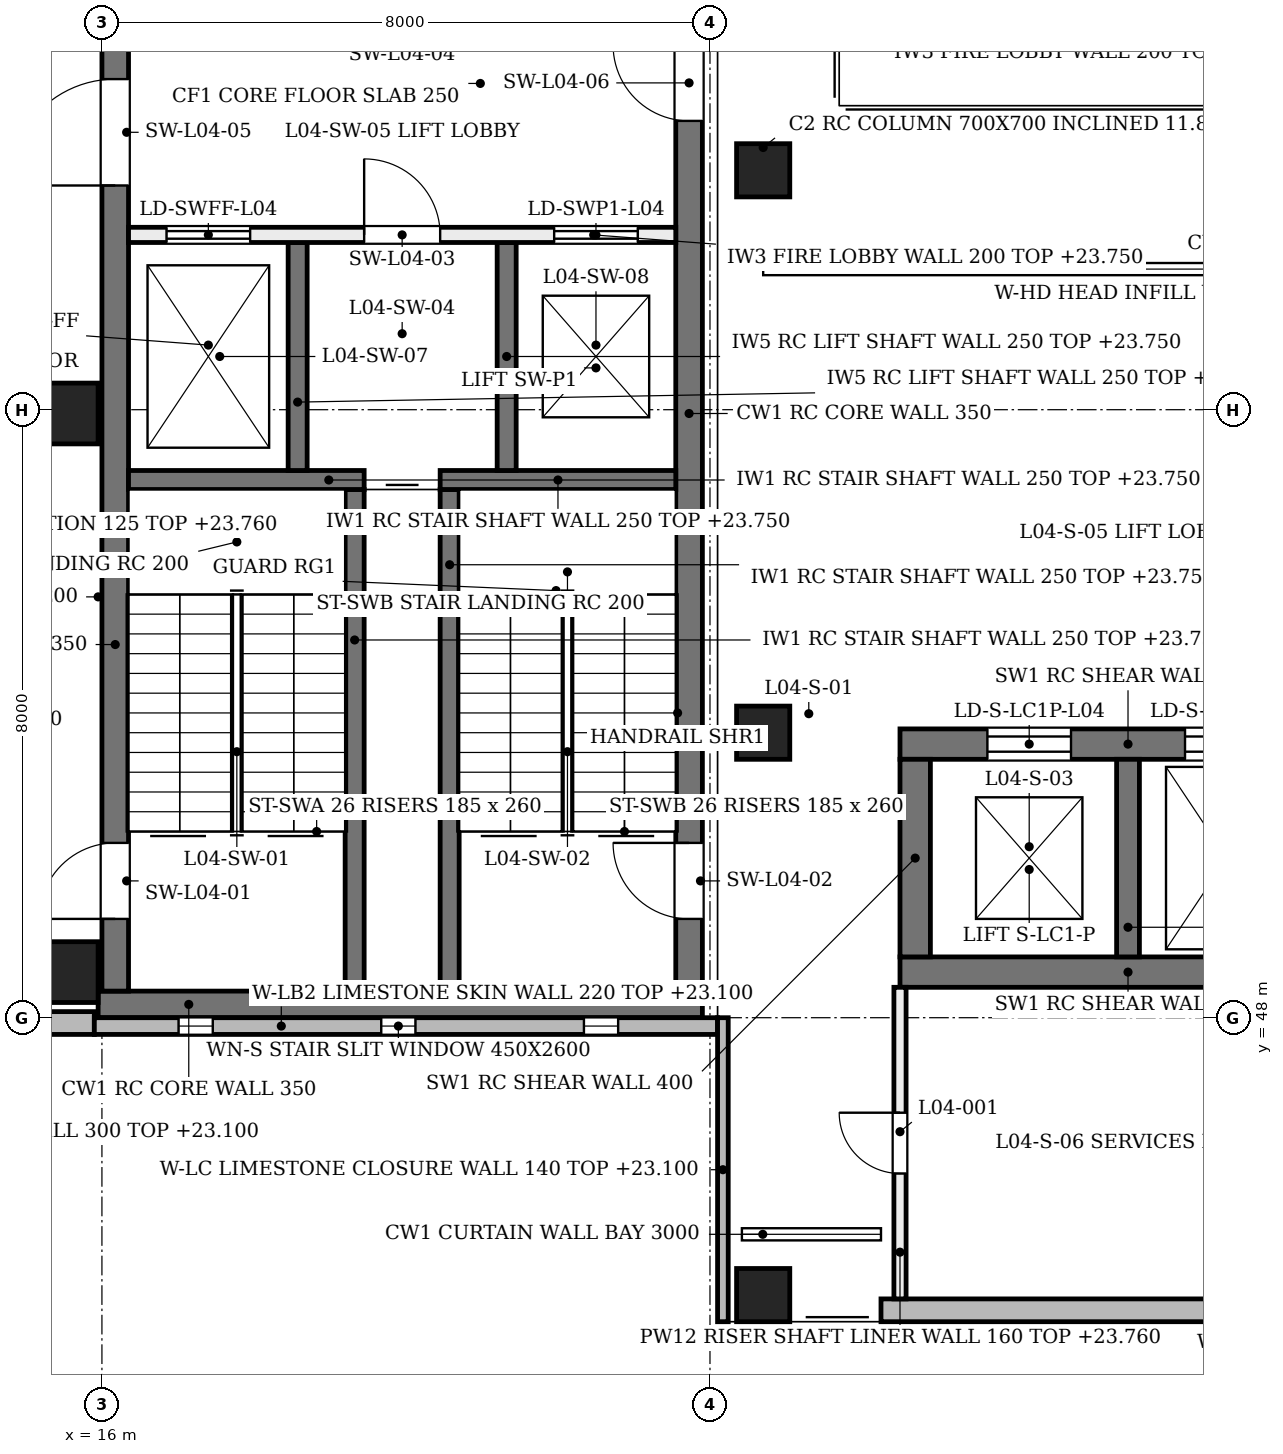
"""IFC4 building model, lengths in metres.
Left out: names, types, materials, properties, quantities, classifications, styles, units other than length and angle.
Written with IfcOpenShell. Run it as: python <this file> out.ifc"""

import sys

from ifc_helpers import new_model, si_unit, direction, frame, frame_2d, origin, origin_2d, place, context, subcontext, project, spatial, rectangle, extrude, element, fill, save


model = new_model("IFC4")
c1 = context("Model", 3, precision=1e-05, world=origin(), true_north=direction((0.0, 1.0)))
c2 = subcontext(c1, "Body", "Model", "MODEL_VIEW")
j1 = project(units=[si_unit("LENGTHUNIT", "METRE"), si_unit("PLANEANGLEUNIT", "RADIAN")], contexts=[c1])
p1 = place(None, origin())
s1 = spatial("IfcSite", under=j1, at=p1, CompositionType="ELEMENT")
p2 = place(p1, origin())
s2 = spatial("IfcBuilding", under=s1, at=p2, CompositionType="ELEMENT")
p3 = place(p2, frame((0.0, 0.0, 19.2)))
s3 = spatial("IfcBuildingStorey", under=s2, at=p3, CompositionType="ELEMENT", Elevation=19.2)
p4 = place(p3, frame((26.5, 48.6, 0.0), z_axis=(0.0, 0.0, 1.0), x_axis=(1.0, 0.0, 0.0)))
e1 = element("IfcWall", 1, at=p4, inside=s3, PredefinedType="SHEAR", context=c2, shape_type="SweptSolid", body=[
    extrude(rectangle(XDim=6.0, YDim=0.4, at=frame_2d((3.0, 0.0))), origin(), (0.0, 0.0, 1.0), 4.58),
])
p5 = place(p3, frame((26.5, 51.6, 0.0), z_axis=(0.0, 0.0, 1.0), x_axis=(1.0, 0.0, 0.0)))
e2 = element("IfcWall", 2, at=p5, inside=s3, PredefinedType="SHEAR", context=c2, shape_type="SweptSolid", body=[
    extrude(rectangle(XDim=6.0, YDim=0.4, at=frame_2d((3.0, 0.0))), origin(), (0.0, 0.0, 1.0), 4.58),
])
p6 = place(p5, frame((1.15, 0.0, 0.0)))
e3 = element("IfcOpeningElement", 3, at=p6, cuts=e2, PredefinedType="OPENING", context=c2, shape_type="SweptSolid", body=[
    extrude(rectangle(XDim=1.1, YDim=2.1, at=frame_2d((0.55, 1.05))), frame((0.0, 0.21, 0.0), z_axis=(0.0, -1.0, 0.0), x_axis=(1.0, 0.0, 0.0)), (0.0, 0.0, 1.0), 0.42),
])
p7 = place(p5, frame((3.75, 0.0, 0.0)))
e4 = element("IfcOpeningElement", 4, at=p7, cuts=e2, PredefinedType="OPENING", context=c2, shape_type="SweptSolid", body=[
    extrude(rectangle(XDim=1.1, YDim=2.1, at=frame_2d((0.55, 1.05))), frame((0.0, 0.21, 0.0), z_axis=(0.0, -1.0, 0.0), x_axis=(1.0, 0.0, 0.0)), (0.0, 0.0, 1.0), 0.42),
])
p8 = place(p3, frame((26.7, 48.8, 0.0), z_axis=(0.0, 0.0, 1.0), x_axis=(0.0, 1.0, 0.0)))
e5 = element("IfcWall", 5, at=p8, inside=s3, PredefinedType="SHEAR", context=c2, shape_type="SweptSolid", body=[
    extrude(rectangle(XDim=2.6, YDim=0.4, at=frame_2d((1.3, 0.0))), origin(), (0.0, 0.0, 1.0), 4.58),
])
p9 = place(p3, frame((29.5, 48.8, 0.0), z_axis=(0.0, 0.0, 1.0), x_axis=(0.0, 1.0, 0.0)))
e6 = element("IfcWall", 6, at=p9, inside=s3, PredefinedType="SHEAR", context=c2, shape_type="SweptSolid", body=[
    extrude(rectangle(XDim=2.6, YDim=0.3, at=frame_2d((1.3, 0.0))), origin(), (0.0, 0.0, 1.0), 4.58),
])
p10 = place(p3, frame((15.95, 48.175, 0.0), z_axis=(0.0, 0.0, 1.0), x_axis=(1.0, 0.0, 0.0)))
e7 = element("IfcWall", 7, at=p10, inside=s3, PredefinedType="SHEAR", context=c2, shape_type="SweptSolid", body=[
    extrude(rectangle(XDim=7.95, YDim=0.35, at=frame_2d((3.975, 0.0))), origin(), (0.0, 0.0, 1.0), 4.58),
])
p11 = place(p3, frame((16.175, 48.35, 0.0), z_axis=(0.0, 0.0, 1.0), x_axis=(0.0, 1.0, 0.0)))
e8 = element("IfcWall", 8, at=p11, inside=s3, PredefinedType="SHEAR", context=c2, shape_type="SweptSolid", body=[
    extrude(rectangle(XDim=15.2, YDim=0.35, at=frame_2d((7.6, 0.0))), origin(), (0.0, 0.0, 1.0), 4.58),
])
p12 = place(p11, frame((0.95, 0.0, 0.0)))
e9 = element("IfcOpeningElement", 9, at=p12, cuts=e8, PredefinedType="OPENING", context=c2, shape_type="SweptSolid", body=[
    extrude(rectangle(XDim=1.0, YDim=2.1, at=frame_2d((0.5, 1.05))), frame((0.0, 0.185, 0.0), z_axis=(0.0, -1.0, 0.0), x_axis=(1.0, 0.0, 0.0)), (0.0, 0.0, 1.0), 0.37),
])
p13 = place(p11, frame((10.6, 0.0, 0.0)))
e10 = element("IfcOpeningElement", 10, at=p13, cuts=e8, PredefinedType="OPENING", context=c2, shape_type="SweptSolid", body=[
    extrude(rectangle(XDim=1.4, YDim=2.1, at=frame_2d((0.7, 1.05))), frame((0.0, 0.185, 0.0), z_axis=(0.0, -1.0, 0.0), x_axis=(1.0, 0.0, 0.0)), (0.0, 0.0, 1.0), 0.37),
])
p14 = place(p3, frame((23.725, 48.35, 0.0), z_axis=(0.0, 0.0, 1.0), x_axis=(0.0, 1.0, 0.0)))
e11 = element("IfcWall", 11, at=p14, inside=s3, PredefinedType="SHEAR", context=c2, shape_type="SweptSolid", body=[
    extrude(rectangle(XDim=15.2, YDim=0.35, at=frame_2d((7.6, 0.0))), origin(), (0.0, 0.0, 1.0), 4.58),
])
p15 = place(p14, frame((0.95, 0.0, 0.0)))
e12 = element("IfcOpeningElement", 12, at=p15, cuts=e11, PredefinedType="OPENING", context=c2, shape_type="SweptSolid", body=[
    extrude(rectangle(XDim=1.0, YDim=2.1, at=frame_2d((0.5, 1.05))), frame((0.0, 0.185, 0.0), z_axis=(0.0, -1.0, 0.0), x_axis=(1.0, 0.0, 0.0)), (0.0, 0.0, 1.0), 0.37),
])
p16 = place(p14, frame((11.45, 0.0, 0.0)))
e13 = element("IfcOpeningElement", 13, at=p16, cuts=e11, PredefinedType="OPENING", context=c2, shape_type="SweptSolid", body=[
    extrude(rectangle(XDim=1.0, YDim=2.1, at=frame_2d((0.5, 1.05))), frame((0.0, 0.185, 0.0), z_axis=(0.0, -1.0, 0.0), x_axis=(1.0, 0.0, 0.0)), (0.0, 0.0, 1.0), 0.37),
])
for number, where, z_axis, x_axis in (
    (14, (15.55, 48.6, 0.0), (0.0, 0.0, 1.0), (1.0, 0.0, 0.0)),
    (15, (15.55, 55.95, 0.0), (0.0, 0.0, 1.0), (1.0, 0.0, 0.0)),
):
    element("IfcColumn", number, at=place(p3, frame(where, z_axis=z_axis, x_axis=x_axis)), inside=s3, PredefinedType="COLUMN", context=c2, shape_type="SweptSolid", body=[
        extrude(rectangle(XDim=0.8, YDim=0.8, at=origin_2d()), origin(), (0.0, 0.0, 1.0), 4.8),
    ])
for number, where, z_axis, x_axis in (
    (16, (24.7, 44.6, 0.0), (0.0, -0.204, 0.979), (1.0, 0.0, 0.0)),
    (17, (24.7, 52.0, 0.0), (0.0, -0.204, 0.979), (1.0, 0.0, 0.0)),
    (18, (24.7, 59.4, 0.0), (0.0, -0.204, 0.979), (1.0, 0.0, 0.0)),
):
    element("IfcColumn", number, at=place(p3, frame(where, z_axis=z_axis, x_axis=x_axis)), inside=s3, PredefinedType="COLUMN", context=c2, shape_type="SweptSolid", body=[
        extrude(rectangle(XDim=0.7, YDim=0.7, at=origin_2d()), origin(), (0.0, 0.0, 1.0), 4.903),
    ])
p17 = place(p3, frame((26.25, 44.15, 0.0), z_axis=(0.0, 0.0, 1.0), x_axis=(1.0, 0.0, 0.0)))
e19 = element("IfcWall", 19, at=p17, inside=s3, PredefinedType="SOLIDWALL", context=c2, shape_type="SweptSolid", body=[
    extrude(rectangle(XDim=6.5, YDim=0.3, at=frame_2d((3.25, 0.0))), origin(), (0.0, 0.0, 1.0), 3.9),
])
p18 = place(p3, frame((24.9, 57.85, 4.1), z_axis=(0.0, 0.0, 1.0), x_axis=(1.0, 0.0, 0.0)))
e20 = element("IfcWall", 20, at=p18, inside=s3, PredefinedType="SOLIDWALL", context=c2, shape_type="SweptSolid", body=[
    extrude(rectangle(XDim=6.9, YDim=0.15, at=frame_2d((3.45, 0.0))), origin(), (0.0, 0.0, 1.0), 0.48),
])
p19 = place(p3, frame((8.0, 47.93, 0.0), z_axis=(0.0, 0.0, 1.0), x_axis=(1.0, 0.0, 0.0)))
e21 = element("IfcWall", 21, at=p19, inside=s3, PredefinedType="SOLIDWALL", context=c2, shape_type="SweptSolid", body=[
    extrude(rectangle(XDim=7.9, YDim=0.3, at=frame_2d((3.95, 0.0))), origin(), (0.0, 0.0, 1.0), 3.9),
])
p20 = place(p19, frame((0.717, 0.0, 0.75)))
e22 = element("IfcOpeningElement", 22, at=p20, cuts=e21, PredefinedType="OPENING", context=c2, shape_type="SweptSolid", body=[
    extrude(rectangle(XDim=1.2, YDim=3.1, at=frame_2d((0.6, 1.55))), frame((0.0, 0.16, 0.0), z_axis=(0.0, -1.0, 0.0), x_axis=(1.0, 0.0, 0.0)), (0.0, 0.0, 1.0), 0.32),
])
p21 = place(p19, frame((3.35, 0.0, 0.75)))
e23 = element("IfcOpeningElement", 23, at=p21, cuts=e21, PredefinedType="OPENING", context=c2, shape_type="SweptSolid", body=[
    extrude(rectangle(XDim=1.2, YDim=3.1, at=frame_2d((0.6, 1.55))), frame((0.0, 0.16, 0.0), z_axis=(0.0, -1.0, 0.0), x_axis=(1.0, 0.0, 0.0)), (0.0, 0.0, 1.0), 0.32),
])
p22 = place(p19, frame((5.983, 0.0, 0.75)))
e24 = element("IfcOpeningElement", 24, at=p22, cuts=e21, PredefinedType="OPENING", context=c2, shape_type="SweptSolid", body=[
    extrude(rectangle(XDim=1.2, YDim=3.1, at=frame_2d((0.6, 1.55))), frame((0.0, 0.16, 0.0), z_axis=(0.0, -1.0, 0.0), x_axis=(1.0, 0.0, 0.0)), (0.0, 0.0, 1.0), 0.32),
])
p23 = place(p3, frame((15.9, 47.89, 0.0), z_axis=(0.0, 0.0, 1.0), x_axis=(1.0, 0.0, 0.0)))
e25 = element("IfcWall", 25, at=p23, inside=s3, PredefinedType="SOLIDWALL", context=c2, shape_type="SweptSolid", body=[
    extrude(rectangle(XDim=8.2, YDim=0.22, at=frame_2d((4.1, 0.0))), origin(), (0.0, 0.0, 1.0), 3.9),
])
p24 = place(p23, frame((1.108, 0.0, 0.9)))
e26 = element("IfcOpeningElement", 26, at=p24, cuts=e25, PredefinedType="OPENING", context=c2, shape_type="SweptSolid", body=[
    extrude(rectangle(XDim=0.45, YDim=2.6, at=frame_2d((0.225, 1.3))), frame((0.0, 0.12, 0.0), z_axis=(0.0, -1.0, 0.0), x_axis=(1.0, 0.0, 0.0)), (0.0, 0.0, 1.0), 0.24),
])
p25 = place(p23, frame((3.775, 0.0, 0.9)))
e27 = element("IfcOpeningElement", 27, at=p25, cuts=e25, PredefinedType="OPENING", context=c2, shape_type="SweptSolid", body=[
    extrude(rectangle(XDim=0.45, YDim=2.6, at=frame_2d((0.225, 1.3))), frame((0.0, 0.12, 0.0), z_axis=(0.0, -1.0, 0.0), x_axis=(1.0, 0.0, 0.0)), (0.0, 0.0, 1.0), 0.24),
])
p26 = place(p23, frame((6.442, 0.0, 0.9)))
e28 = element("IfcOpeningElement", 28, at=p26, cuts=e25, PredefinedType="OPENING", context=c2, shape_type="SweptSolid", body=[
    extrude(rectangle(XDim=0.45, YDim=2.6, at=frame_2d((0.225, 1.3))), frame((0.0, 0.12, 0.0), z_axis=(0.0, -1.0, 0.0), x_axis=(1.0, 0.0, 0.0)), (0.0, 0.0, 1.0), 0.24),
])
p27 = place(p3, frame((24.17, 44.0, 0.0), z_axis=(0.0, 0.0, 1.0), x_axis=(0.0, 1.0, 0.0)))
e29 = element("IfcWall", 29, at=p27, inside=s3, PredefinedType="SOLIDWALL", context=c2, shape_type="SweptSolid", body=[
    extrude(rectangle(XDim=4.0, YDim=0.14, at=frame_2d((2.0, 0.0))), origin(), (0.0, 0.0, 1.0), 3.9),
])
for number, where, z_axis, x_axis in (
    (30, (19.325, 48.35, 0.0), (0.0, 0.0, 1.0), (0.0, 1.0, 0.0)),
    (31, (20.575, 48.35, 0.0), (0.0, 0.0, 1.0), (0.0, 1.0, 0.0)),
):
    element("IfcWall", number, at=place(p3, frame(where, z_axis=z_axis, x_axis=x_axis)), inside=s3, PredefinedType="SOLIDWALL", context=c2, shape_type="SweptSolid", body=[
        extrude(rectangle(XDim=6.6, YDim=0.25, at=frame_2d((3.3, 0.0))), origin(), (0.0, 0.0, 1.0), 4.55),
    ])
p28 = place(p3, frame((16.35, 55.075, 0.0), z_axis=(0.0, 0.0, 1.0), x_axis=(1.0, 0.0, 0.0)))
e32 = element("IfcWall", 32, at=p28, inside=s3, PredefinedType="SOLIDWALL", context=c2, shape_type="SweptSolid", body=[
    extrude(rectangle(XDim=3.1, YDim=0.25, at=frame_2d((1.55, 0.0))), origin(), (0.0, 0.0, 1.0), 4.55),
])
p29 = place(p3, frame((20.45, 55.075, 0.0), z_axis=(0.0, 0.0, 1.0), x_axis=(1.0, 0.0, 0.0)))
e33 = element("IfcWall", 33, at=p29, inside=s3, PredefinedType="SOLIDWALL", context=c2, shape_type="SweptSolid", body=[
    extrude(rectangle(XDim=3.1, YDim=0.25, at=frame_2d((1.55, 0.0))), origin(), (0.0, 0.0, 1.0), 4.55),
])
for number, where, z_axis, x_axis in (
    (34, (18.575, 55.2, 0.0), (0.0, 0.0, 1.0), (0.0, 1.0, 0.0)),
    (35, (21.325, 55.2, 0.0), (0.0, 0.0, 1.0), (0.0, 1.0, 0.0)),
):
    element("IfcWall", number, at=place(p3, frame(where, z_axis=z_axis, x_axis=x_axis)), inside=s3, PredefinedType="SOLIDWALL", context=c2, shape_type="SweptSolid", body=[
        extrude(rectangle(XDim=3.0, YDim=0.25, at=frame_2d((1.5, 0.0))), origin(), (0.0, 0.0, 1.0), 4.55),
    ])
p30 = place(p3, frame((16.35, 58.3, 0.0), z_axis=(0.0, 0.0, 1.0), x_axis=(1.0, 0.0, 0.0)))
e36 = element("IfcWall", 36, at=p30, inside=s3, PredefinedType="SOLIDWALL", context=c2, shape_type="SweptSolid", body=[
    extrude(rectangle(XDim=7.2, YDim=0.2, at=frame_2d((3.6, 0.0))), origin(), (0.0, 0.0, 1.0), 4.55),
])
p31 = place(p30, frame((0.5, 0.0, 0.0)))
e37 = element("IfcOpeningElement", 37, at=p31, cuts=e36, PredefinedType="OPENING", context=c2, shape_type="SweptSolid", body=[
    extrude(rectangle(XDim=1.1, YDim=2.1, at=frame_2d((0.55, 1.05))), frame((0.0, 0.11, 0.0), z_axis=(0.0, -1.0, 0.0), x_axis=(1.0, 0.0, 0.0)), (0.0, 0.0, 1.0), 0.22),
])
p32 = place(p30, frame((5.6, 0.0, 0.0)))
e38 = element("IfcOpeningElement", 38, at=p32, cuts=e36, PredefinedType="OPENING", context=c2, shape_type="SweptSolid", body=[
    extrude(rectangle(XDim=1.1, YDim=2.1, at=frame_2d((0.55, 1.05))), frame((0.0, 0.11, 0.0), z_axis=(0.0, -1.0, 0.0), x_axis=(1.0, 0.0, 0.0)), (0.0, 0.0, 1.0), 0.22),
])
p33 = place(p30, frame((3.1, 0.0, 0.0)))
e39 = element("IfcOpeningElement", 39, at=p33, cuts=e36, PredefinedType="OPENING", context=c2, shape_type="SweptSolid", body=[
    extrude(rectangle(XDim=1.0, YDim=2.1, at=frame_2d((0.5, 1.05))), frame((0.0, 0.11, 0.0), z_axis=(0.0, -1.0, 0.0), x_axis=(1.0, 0.0, 0.0)), (0.0, 0.0, 1.0), 0.22),
])
p34 = place(p3, frame((26.5, 44.3, 0.0), z_axis=(0.0, 0.0, 1.0), x_axis=(0.0, 1.0, 0.0)))
e40 = element("IfcWall", 40, at=p34, inside=s3, PredefinedType="PARTITIONING", context=c2, shape_type="SweptSolid", body=[
    extrude(rectangle(XDim=4.1, YDim=0.16, at=frame_2d((2.05, 0.0))), origin(), (0.0, 0.0, 1.0), 4.56),
])
p35 = place(p34, frame((1.65, 0.0, 0.0)))
e41 = element("IfcOpeningElement", 41, at=p35, cuts=e40, PredefinedType="OPENING", context=c2, shape_type="SweptSolid", body=[
    extrude(rectangle(XDim=0.8, YDim=2.1, at=frame_2d((0.4, 1.05))), frame((0.0, 0.09, 0.0), z_axis=(0.0, -1.0, 0.0), x_axis=(1.0, 0.0, 0.0)), (0.0, 0.0, 1.0), 0.18),
])
p36 = place(p24, origin())
e42 = element("IfcWindow", 42, at=p36, inside=s3, PartitioningType="SINGLE_PANEL", PredefinedType="WINDOW", context=c2, shape_type="SweptSolid", body=[
    extrude(rectangle(XDim=0.45, YDim=2.6, at=frame_2d((0.225, 1.3))), frame((0.0, 0.03, 0.0), z_axis=(0.0, -1.0, 0.0), x_axis=(1.0, 0.0, 0.0)), (0.0, 0.0, 1.0), 0.06),
])
fill(e26, e42)
p37 = place(p25, origin())
e43 = element("IfcWindow", 43, at=p37, inside=s3, PartitioningType="SINGLE_PANEL", PredefinedType="WINDOW", context=c2, shape_type="SweptSolid", body=[
    extrude(rectangle(XDim=0.45, YDim=2.6, at=frame_2d((0.225, 1.3))), frame((0.0, 0.03, 0.0), z_axis=(0.0, -1.0, 0.0), x_axis=(1.0, 0.0, 0.0)), (0.0, 0.0, 1.0), 0.06),
])
fill(e27, e43)
p38 = place(p26, origin())
e44 = element("IfcWindow", 44, at=p38, inside=s3, PartitioningType="SINGLE_PANEL", PredefinedType="WINDOW", context=c2, shape_type="SweptSolid", body=[
    extrude(rectangle(XDim=0.45, YDim=2.6, at=frame_2d((0.225, 1.3))), frame((0.0, 0.03, 0.0), z_axis=(0.0, -1.0, 0.0), x_axis=(1.0, 0.0, 0.0)), (0.0, 0.0, 1.0), 0.06),
])
fill(e28, e44)
p39 = place(p12, origin())
e45 = element("IfcDoor", 45, at=p39, inside=s3, OperationType="SINGLE_SWING_LEFT", PredefinedType="DOOR", context=c2, shape_type="SweptSolid", body=[
    extrude(rectangle(XDim=1.0, YDim=2.1, at=frame_2d((0.5, 1.05))), frame((0.0, 0.025, 0.0), z_axis=(0.0, -1.0, 0.0), x_axis=(1.0, 0.0, 0.0)), (0.0, 0.0, 1.0), 0.05),
])
fill(e9, e45)
p40 = place(p15, frame((1.0, 0.0, 0.0), z_axis=(0.0, 0.0, 1.0), x_axis=(-1.0, 0.0, 0.0)))
e46 = element("IfcDoor", 46, at=p40, inside=s3, OperationType="SINGLE_SWING_RIGHT", PredefinedType="DOOR", context=c2, shape_type="SweptSolid", body=[
    extrude(rectangle(XDim=1.0, YDim=2.1, at=frame_2d((0.5, 1.05))), frame((0.0, 0.025, 0.0), z_axis=(0.0, -1.0, 0.0), x_axis=(1.0, 0.0, 0.0)), (0.0, 0.0, 1.0), 0.05),
])
fill(e12, e46)
p41 = place(p31, origin())
e47 = element("IfcDoor", 47, at=p41, inside=s3, OperationType="DOUBLE_DOOR_SLIDING", PredefinedType="DOOR", context=c2, shape_type="SweptSolid", body=[
    extrude(rectangle(XDim=1.1, YDim=2.1, at=frame_2d((0.55, 1.05))), frame((0.0, 0.025, 0.0), z_axis=(0.0, -1.0, 0.0), x_axis=(1.0, 0.0, 0.0)), (0.0, 0.0, 1.0), 0.05),
])
fill(e37, e47)
p42 = place(p32, origin())
e48 = element("IfcDoor", 48, at=p42, inside=s3, OperationType="DOUBLE_DOOR_SLIDING", PredefinedType="DOOR", context=c2, shape_type="SweptSolid", body=[
    extrude(rectangle(XDim=1.1, YDim=2.1, at=frame_2d((0.55, 1.05))), frame((0.0, 0.025, 0.0), z_axis=(0.0, -1.0, 0.0), x_axis=(1.0, 0.0, 0.0)), (0.0, 0.0, 1.0), 0.05),
])
fill(e38, e48)
p43 = place(p33, origin())
e49 = element("IfcDoor", 49, at=p43, inside=s3, OperationType="SINGLE_SWING_LEFT", PredefinedType="DOOR", context=c2, shape_type="SweptSolid", body=[
    extrude(rectangle(XDim=1.0, YDim=2.1, at=frame_2d((0.5, 1.05))), frame((0.0, 0.025, 0.0), z_axis=(0.0, -1.0, 0.0), x_axis=(1.0, 0.0, 0.0)), (0.0, 0.0, 1.0), 0.05),
])
fill(e39, e49)
p44 = place(p13, origin())
e50 = element("IfcDoor", 50, at=p44, inside=s3, OperationType="SINGLE_SWING_LEFT", PredefinedType="DOOR", context=c2, shape_type="SweptSolid", body=[
    extrude(rectangle(XDim=1.4, YDim=2.1, at=frame_2d((0.7, 1.05))), frame((0.0, 0.025, 0.0), z_axis=(0.0, -1.0, 0.0), x_axis=(1.0, 0.0, 0.0)), (0.0, 0.0, 1.0), 0.05),
])
fill(e10, e50)
p45 = place(p16, frame((1.0, 0.0, 0.0), z_axis=(0.0, 0.0, 1.0), x_axis=(-1.0, 0.0, 0.0)))
e51 = element("IfcDoor", 51, at=p45, inside=s3, OperationType="SINGLE_SWING_RIGHT", PredefinedType="DOOR", context=c2, shape_type="SweptSolid", body=[
    extrude(rectangle(XDim=1.0, YDim=2.1, at=frame_2d((0.5, 1.05))), frame((0.0, 0.025, 0.0), z_axis=(0.0, -1.0, 0.0), x_axis=(1.0, 0.0, 0.0)), (0.0, 0.0, 1.0), 0.05),
])
fill(e13, e51)
p46 = place(p6, origin())
e52 = element("IfcDoor", 52, at=p46, inside=s3, OperationType="DOUBLE_DOOR_SLIDING", PredefinedType="DOOR", context=c2, shape_type="SweptSolid", body=[
    extrude(rectangle(XDim=1.1, YDim=2.1, at=frame_2d((0.55, 1.05))), frame((0.0, 0.025, 0.0), z_axis=(0.0, -1.0, 0.0), x_axis=(1.0, 0.0, 0.0)), (0.0, 0.0, 1.0), 0.05),
])
fill(e3, e52)
p47 = place(p7, origin())
e53 = element("IfcDoor", 53, at=p47, inside=s3, OperationType="DOUBLE_DOOR_SLIDING", PredefinedType="DOOR", context=c2, shape_type="SweptSolid", body=[
    extrude(rectangle(XDim=1.1, YDim=2.1, at=frame_2d((0.55, 1.05))), frame((0.0, 0.025, 0.0), z_axis=(0.0, -1.0, 0.0), x_axis=(1.0, 0.0, 0.0)), (0.0, 0.0, 1.0), 0.05),
])
fill(e4, e53)
p48 = place(p35, frame((0.8, 0.0, 0.0), z_axis=(0.0, 0.0, 1.0), x_axis=(-1.0, 0.0, 0.0)))
e54 = element("IfcDoor", 54, at=p48, inside=s3, OperationType="SINGLE_SWING_RIGHT", PredefinedType="DOOR", context=c2, shape_type="SweptSolid", body=[
    extrude(rectangle(XDim=0.8, YDim=2.1, at=frame_2d((0.4, 1.05))), frame((0.0, 0.025, 0.0), z_axis=(0.0, -1.0, 0.0), x_axis=(1.0, 0.0, 0.0)), (0.0, 0.0, 1.0), 0.05),
])
fill(e41, e54)
save(model, sys.argv[1])
